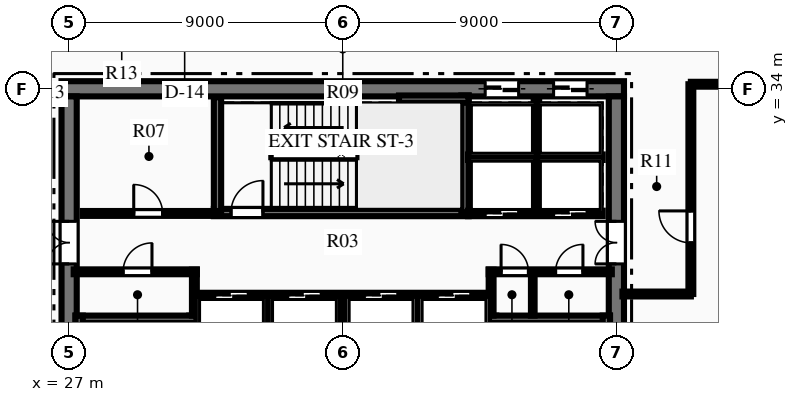
"""IFC4 building model, lengths in metres.
Left out: names, types, materials, properties, quantities, classifications, styles, units other than length and angle.
Written with IfcOpenShell. Run it as: python <this file> out.ifc"""

import sys

from ifc_helpers import new_model, si_unit, direction, frame, frame_2d, origin, place, context, subcontext, project, spatial, rectangle, extrude, element, fill, save


model = new_model("IFC4")
c1 = context("Model", 3, precision=1e-05, world=origin(), true_north=direction((0.0, 1.0)))
c2 = subcontext(c1, "Body", "Model", "MODEL_VIEW")
j1 = project(units=[si_unit("LENGTHUNIT", "METRE"), si_unit("PLANEANGLEUNIT", "RADIAN")], contexts=[c1])
p1 = place(None, origin())
s1 = spatial("IfcSite", under=j1, at=p1, CompositionType="ELEMENT")
p2 = place(p1, origin())
s2 = spatial("IfcBuilding", under=s1, at=p2, CompositionType="ELEMENT")
p3 = place(p2, frame((0.0, 0.0, 198.45)))
s3 = spatial("IfcBuildingStorey", under=s2, at=p3, CompositionType="ELEMENT", Elevation=198.45)
p4 = place(p3, frame((26.75, 34.0, 0.0), z_axis=(0.0, 0.0, 1.0), x_axis=(1.0, 0.0, 0.0)))
e1 = element("IfcWall", 1, at=p4, inside=s3, PredefinedType="SHEAR", context=c2, shape_type="SweptSolid", body=[
    extrude(rectangle(XDim=18.5, YDim=0.5, at=frame_2d((9.25, 0.0))), origin(), (0.0, 0.0, 1.0), 3.75),
])
p5 = place(p4, frame((13.935, 0.0, 0.0)))
e2 = element("IfcOpeningElement", 2, at=p5, cuts=e1, PredefinedType="OPENING", context=c2, shape_type="SweptSolid", body=[
    extrude(rectangle(XDim=1.1, YDim=2.15, at=frame_2d((0.55, 1.075))), frame((0.0, 0.26, 0.0), z_axis=(0.0, -1.0, 0.0), x_axis=(1.0, 0.0, 0.0)), (0.0, 0.0, 1.0), 0.52),
])
p6 = place(p4, frame((16.185, 0.0, 0.0)))
e3 = element("IfcOpeningElement", 3, at=p6, cuts=e1, PredefinedType="OPENING", context=c2, shape_type="SweptSolid", body=[
    extrude(rectangle(XDim=1.1, YDim=2.15, at=frame_2d((0.55, 1.075))), frame((0.0, 0.26, 0.0), z_axis=(0.0, -1.0, 0.0), x_axis=(1.0, 0.0, 0.0)), (0.0, 0.0, 1.0), 0.52),
])
p7 = place(p3, frame((27.0, 18.25, 0.0), z_axis=(0.0, 0.0, 1.0), x_axis=(0.0, 1.0, 0.0)))
e4 = element("IfcWall", 4, at=p7, inside=s3, PredefinedType="SHEAR", context=c2, shape_type="SweptSolid", body=[
    extrude(rectangle(XDim=15.5, YDim=0.5, at=frame_2d((7.75, 0.0))), origin(), (0.0, 0.0, 1.0), 3.75),
])
p8 = place(p7, frame((9.99, 0.0, 0.0)))
e5 = element("IfcOpeningElement", 5, at=p8, cuts=e4, PredefinedType="OPENING", context=c2, shape_type="SweptSolid", body=[
    extrude(rectangle(XDim=1.4, YDim=2.2, at=frame_2d((0.7, 1.1))), frame((0.0, 0.26, 0.0), z_axis=(0.0, -1.0, 0.0), x_axis=(1.0, 0.0, 0.0)), (0.0, 0.0, 1.0), 0.52),
])
p9 = place(p3, frame((45.0, 18.25, 0.0), z_axis=(0.0, 0.0, 1.0), x_axis=(0.0, 1.0, 0.0)))
e6 = element("IfcWall", 6, at=p9, inside=s3, PredefinedType="SHEAR", context=c2, shape_type="SweptSolid", body=[
    extrude(rectangle(XDim=15.5, YDim=0.5, at=frame_2d((7.75, 0.0))), origin(), (0.0, 0.0, 1.0), 3.75),
])
p10 = place(p9, frame((9.99, 0.0, 0.0)))
e7 = element("IfcOpeningElement", 7, at=p10, cuts=e6, PredefinedType="OPENING", context=c2, shape_type="SweptSolid", body=[
    extrude(rectangle(XDim=1.4, YDim=2.2, at=frame_2d((0.7, 1.1))), frame((0.0, 0.26, 0.0), z_axis=(0.0, -1.0, 0.0), x_axis=(1.0, 0.0, 0.0)), (0.0, 0.0, 1.0), 0.52),
])
p11 = place(p3, frame((31.07, 18.28, 0.0), z_axis=(0.0, 0.0, 1.0), x_axis=(0.0, 1.0, 0.0)))
e8 = element("IfcWall", 8, at=p11, inside=s3, PredefinedType="SHEAR", context=c2, shape_type="SweptSolid", body=[
    extrude(rectangle(XDim=8.26, YDim=0.24, at=frame_2d((4.13, 0.0))), origin(), (0.0, 0.0, 1.0), 3.75),
])
p12 = place(p11, frame((0.365, 0.0, 0.0)))
e9 = element("IfcOpeningElement", 9, at=p12, cuts=e8, PredefinedType="OPENING", context=c2, shape_type="SweptSolid", body=[
    extrude(rectangle(XDim=1.05, YDim=2.15, at=frame_2d((0.525, 1.075))), frame((0.0, 0.13, 0.0), z_axis=(0.0, -1.0, 0.0), x_axis=(1.0, 0.0, 0.0)), (0.0, 0.0, 1.0), 0.26),
])
p13 = place(p3, frame((27.21, 26.42, 0.0), z_axis=(0.0, 0.0, 1.0), x_axis=(1.0, 0.0, 0.0)))
e10 = element("IfcWall", 10, at=p13, inside=s3, PredefinedType="SHEAR", context=c2, shape_type="SweptSolid", body=[
    extrude(rectangle(XDim=3.98, YDim=0.24, at=frame_2d((1.99, 0.0))), origin(), (0.0, 0.0, 1.0), 3.75),
])
p14 = place(p3, frame((27.33, 18.28, 0.0), z_axis=(0.0, 0.0, 1.0), x_axis=(0.0, 1.0, 0.0)))
e11 = element("IfcWall", 11, at=p14, inside=s3, PredefinedType="SHEAR", context=c2, shape_type="SweptSolid", body=[
    extrude(rectangle(XDim=8.26, YDim=0.24, at=frame_2d((4.13, 0.0))), origin(), (0.0, 0.0, 1.0), 3.75),
])
p15 = place(p3, frame((40.93, 18.28, 0.0), z_axis=(0.0, 0.0, 1.0), x_axis=(0.0, 1.0, 0.0)))
e12 = element("IfcWall", 12, at=p15, inside=s3, PredefinedType="SHEAR", context=c2, shape_type="SweptSolid", body=[
    extrude(rectangle(XDim=8.26, YDim=0.24, at=frame_2d((4.13, 0.0))), origin(), (0.0, 0.0, 1.0), 3.75),
])
p16 = place(p15, frame((0.365, 0.0, 0.0)))
e13 = element("IfcOpeningElement", 13, at=p16, cuts=e12, PredefinedType="OPENING", context=c2, shape_type="SweptSolid", body=[
    extrude(rectangle(XDim=1.05, YDim=2.15, at=frame_2d((0.525, 1.075))), frame((0.0, 0.13, 0.0), z_axis=(0.0, -1.0, 0.0), x_axis=(1.0, 0.0, 0.0)), (0.0, 0.0, 1.0), 0.26),
])
p17 = place(p3, frame((40.81, 26.42, 0.0), z_axis=(0.0, 0.0, 1.0), x_axis=(1.0, 0.0, 0.0)))
e14 = element("IfcWall", 14, at=p17, inside=s3, PredefinedType="SHEAR", context=c2, shape_type="SweptSolid", body=[
    extrude(rectangle(XDim=3.98, YDim=0.24, at=frame_2d((1.99, 0.0))), origin(), (0.0, 0.0, 1.0), 3.75),
])
p18 = place(p3, frame((44.67, 18.28, 0.0), z_axis=(0.0, 0.0, 1.0), x_axis=(0.0, 1.0, 0.0)))
e15 = element("IfcWall", 15, at=p18, inside=s3, PredefinedType="SHEAR", context=c2, shape_type="SweptSolid", body=[
    extrude(rectangle(XDim=8.26, YDim=0.24, at=frame_2d((4.13, 0.0))), origin(), (0.0, 0.0, 1.0), 3.75),
])
p19 = place(p3, frame((31.76, 29.93, 0.0), z_axis=(0.0, 0.0, 1.0), x_axis=(1.0, 0.0, 0.0)))
e16 = element("IfcWall", 16, at=p19, inside=s3, PredefinedType="SHEAR", context=c2, shape_type="SweptSolid", body=[
    extrude(rectangle(XDim=8.38, YDim=0.24, at=frame_2d((4.19, 0.0))), origin(), (0.0, 0.0, 1.0), 3.75),
])
p20 = place(p19, frame((0.565, 0.0, 0.0)))
e17 = element("IfcOpeningElement", 17, at=p20, cuts=e16, PredefinedType="OPENING", context=c2, shape_type="SweptSolid", body=[
    extrude(rectangle(XDim=1.05, YDim=2.15, at=frame_2d((0.525, 1.075))), frame((0.0, 0.13, 0.0), z_axis=(0.0, -1.0, 0.0), x_axis=(1.0, 0.0, 0.0)), (0.0, 0.0, 1.0), 0.26),
])
p21 = place(p3, frame((31.88, 29.93, 0.0), z_axis=(0.0, 0.0, 1.0), x_axis=(0.0, 1.0, 0.0)))
e18 = element("IfcWall", 18, at=p21, inside=s3, PredefinedType="SHEAR", context=c2, shape_type="SweptSolid", body=[
    extrude(rectangle(XDim=3.79, YDim=0.24, at=frame_2d((1.895, 0.0))), origin(), (0.0, 0.0, 1.0), 3.75),
])
p22 = place(p3, frame((40.02, 29.93, 0.0), z_axis=(0.0, 0.0, 1.0), x_axis=(0.0, 1.0, 0.0)))
e19 = element("IfcWall", 19, at=p22, inside=s3, PredefinedType="SHEAR", context=c2, shape_type="SweptSolid", body=[
    extrude(rectangle(XDim=3.85, YDim=0.24, at=frame_2d((1.925, 0.0))), origin(), (0.0, 0.0, 1.0), 3.75),
])
p23 = place(p3, frame((37.85, 33.66, 0.0), z_axis=(0.0, 0.0, 1.0), x_axis=(1.0, 0.0, 0.0)))
e20 = element("IfcWall", 20, at=p23, inside=s3, PredefinedType="SHEAR", context=c2, shape_type="SweptSolid", body=[
    extrude(rectangle(XDim=2.29, YDim=0.24, at=frame_2d((1.145, 0.0))), origin(), (0.0, 0.0, 1.0), 3.75),
])
p24 = place(p3, frame((27.15, 27.98, 0.0), z_axis=(0.0, 0.0, 1.0), x_axis=(1.0, 0.0, 0.0)))
e21 = element("IfcWall", 21, at=p24, inside=s3, PredefinedType="PARTITIONING", context=c2, shape_type="SweptSolid", body=[
    extrude(rectangle(XDim=4.05, YDim=0.16, at=frame_2d((2.025, 0.0))), origin(), (0.0, 0.0, 1.0), 3.47),
])
p25 = place(p24, frame((1.625, 0.0, 0.0)))
e22 = element("IfcOpeningElement", 22, at=p25, cuts=e21, PredefinedType="OPENING", context=c2, shape_type="SweptSolid", body=[
    extrude(rectangle(XDim=0.95, YDim=2.15, at=frame_2d((0.475, 1.075))), frame((0.0, 0.09, 0.0), z_axis=(0.0, -1.0, 0.0), x_axis=(1.0, 0.0, 0.0)), (0.0, 0.0, 1.0), 0.18),
])
p26 = place(p3, frame((31.12, 26.54, 0.0), z_axis=(0.0, 0.0, 1.0), x_axis=(0.0, 1.0, 0.0)))
e23 = element("IfcWall", 23, at=p26, inside=s3, PredefinedType="PARTITIONING", context=c2, shape_type="SweptSolid", body=[
    extrude(rectangle(XDim=1.51, YDim=0.16, at=frame_2d((0.755, 0.0))), origin(), (0.0, 0.0, 1.0), 3.47),
])
p27 = place(p3, frame((40.8, 27.98, 0.0), z_axis=(0.0, 0.0, 1.0), x_axis=(1.0, 0.0, 0.0)))
e24 = element("IfcWall", 24, at=p27, inside=s3, PredefinedType="PARTITIONING", context=c2, shape_type="SweptSolid", body=[
    extrude(rectangle(XDim=4.05, YDim=0.16, at=frame_2d((2.025, 0.0))), origin(), (0.0, 0.0, 1.0), 3.47),
])
p28 = place(p27, frame((0.407, 0.0, 0.0)))
e25 = element("IfcOpeningElement", 25, at=p28, cuts=e24, PredefinedType="OPENING", context=c2, shape_type="SweptSolid", body=[
    extrude(rectangle(XDim=0.9, YDim=2.15, at=frame_2d((0.45, 1.075))), frame((0.0, 0.09, 0.0), z_axis=(0.0, -1.0, 0.0), x_axis=(1.0, 0.0, 0.0)), (0.0, 0.0, 1.0), 0.18),
])
p29 = place(p27, frame((2.2, 0.0, 0.0)))
e26 = element("IfcOpeningElement", 26, at=p29, cuts=e24, PredefinedType="OPENING", context=c2, shape_type="SweptSolid", body=[
    extrude(rectangle(XDim=0.9, YDim=2.15, at=frame_2d((0.45, 1.075))), frame((0.0, 0.09, 0.0), z_axis=(0.0, -1.0, 0.0), x_axis=(1.0, 0.0, 0.0)), (0.0, 0.0, 1.0), 0.18),
])
p30 = place(p3, frame((40.88, 26.54, 0.0), z_axis=(0.0, 0.0, 1.0), x_axis=(0.0, 1.0, 0.0)))
e27 = element("IfcWall", 27, at=p30, inside=s3, PredefinedType="PARTITIONING", context=c2, shape_type="SweptSolid", body=[
    extrude(rectangle(XDim=1.51, YDim=0.16, at=frame_2d((0.755, 0.0))), origin(), (0.0, 0.0, 1.0), 3.47),
])
p31 = place(p3, frame((42.25, 26.54, 0.0), z_axis=(0.0, 0.0, 1.0), x_axis=(0.0, 1.0, 0.0)))
e28 = element("IfcWall", 28, at=p31, inside=s3, PredefinedType="PARTITIONING", context=c2, shape_type="SweptSolid", body=[
    extrude(rectangle(XDim=1.44, YDim=0.12, at=frame_2d((0.72, 0.0))), origin(), (0.0, 0.0, 1.0), 3.47),
])
p32 = place(p3, frame((27.45, 29.9, 0.0), z_axis=(0.0, 0.0, 1.0), x_axis=(1.0, 0.0, 0.0)))
e29 = element("IfcWall", 29, at=p32, inside=s3, PredefinedType="PARTITIONING", context=c2, shape_type="SweptSolid", body=[
    extrude(rectangle(XDim=4.43, YDim=0.16, at=frame_2d((2.215, 0.0))), origin(), (0.0, 0.0, 1.0), 3.47),
])
p33 = place(p32, frame((1.675, 0.0, 0.0)))
e30 = element("IfcOpeningElement", 30, at=p33, cuts=e29, PredefinedType="OPENING", context=c2, shape_type="SweptSolid", body=[
    extrude(rectangle(XDim=0.95, YDim=2.15, at=frame_2d((0.475, 1.075))), frame((0.0, 0.09, 0.0), z_axis=(0.0, -1.0, 0.0), x_axis=(1.0, 0.0, 0.0)), (0.0, 0.0, 1.0), 0.18),
])
p34 = place(p3, frame((40.12, 29.9, 0.0), z_axis=(0.0, 0.0, 1.0), x_axis=(1.0, 0.0, 0.0)))
e31 = element("IfcWall", 31, at=p34, inside=s3, PredefinedType="PARTITIONING", context=c2, shape_type="SweptSolid", body=[
    extrude(rectangle(XDim=4.43, YDim=0.18, at=frame_2d((2.215, 0.0))), origin(), (0.0, 0.0, 1.0), 3.47),
])
p35 = place(p34, frame((0.565, 0.0, 0.0)))
e32 = element("IfcOpeningElement", 32, at=p35, cuts=e31, PredefinedType="OPENING", context=c2, shape_type="SweptSolid", body=[
    extrude(rectangle(XDim=1.1, YDim=2.15, at=frame_2d((0.55, 1.075))), frame((0.0, 0.1, 0.0), z_axis=(0.0, -1.0, 0.0), x_axis=(1.0, 0.0, 0.0)), (0.0, 0.0, 1.0), 0.2),
])
p36 = place(p34, frame((2.815, 0.0, 0.0)))
e33 = element("IfcOpeningElement", 33, at=p36, cuts=e31, PredefinedType="OPENING", context=c2, shape_type="SweptSolid", body=[
    extrude(rectangle(XDim=1.1, YDim=2.15, at=frame_2d((0.55, 1.075))), frame((0.0, 0.1, 0.0), z_axis=(0.0, -1.0, 0.0), x_axis=(1.0, 0.0, 0.0)), (0.0, 0.0, 1.0), 0.2),
])
p37 = place(p3, frame((40.12, 31.75, 0.0), z_axis=(0.0, 0.0, 1.0), x_axis=(1.0, 0.0, 0.0)))
e34 = element("IfcWall", 34, at=p37, inside=s3, PredefinedType="PARTITIONING", context=c2, shape_type="SweptSolid", body=[
    extrude(rectangle(XDim=4.43, YDim=0.18, at=frame_2d((2.215, 0.0))), origin(), (0.0, 0.0, 1.0), 3.47),
])
p38 = place(p3, frame((42.37, 29.9, 0.0), z_axis=(0.0, 0.0, 1.0), x_axis=(0.0, 1.0, 0.0)))
e35 = element("IfcWall", 35, at=p38, inside=s3, PredefinedType="PARTITIONING", context=c2, shape_type="SweptSolid", body=[
    extrude(rectangle(XDim=3.75, YDim=0.18, at=frame_2d((1.875, 0.0))), origin(), (0.0, 0.0, 1.0), 3.47),
])
p39 = place(p3, frame((31.2, 27.2, 0.0), z_axis=(0.0, 0.0, 1.0), x_axis=(1.0, 0.0, 0.0)))
e36 = element("IfcWall", 36, at=p39, inside=s3, PredefinedType="PARTITIONING", context=c2, shape_type="SweptSolid", body=[
    extrude(rectangle(XDim=9.6, YDim=0.18, at=frame_2d((4.8, 0.0))), origin(), (0.0, 0.0, 1.0), 3.47),
])
p40 = place(p39, frame((0.59, 0.0, 0.0)))
e37 = element("IfcOpeningElement", 37, at=p40, cuts=e36, PredefinedType="OPENING", context=c2, shape_type="SweptSolid", body=[
    extrude(rectangle(XDim=1.1, YDim=2.15, at=frame_2d((0.55, 1.075))), frame((0.0, 0.1, 0.0), z_axis=(0.0, -1.0, 0.0), x_axis=(1.0, 0.0, 0.0)), (0.0, 0.0, 1.0), 0.2),
])
p41 = place(p39, frame((2.99, 0.0, 0.0)))
e38 = element("IfcOpeningElement", 38, at=p41, cuts=e36, PredefinedType="OPENING", context=c2, shape_type="SweptSolid", body=[
    extrude(rectangle(XDim=1.1, YDim=2.15, at=frame_2d((0.55, 1.075))), frame((0.0, 0.1, 0.0), z_axis=(0.0, -1.0, 0.0), x_axis=(1.0, 0.0, 0.0)), (0.0, 0.0, 1.0), 0.2),
])
p42 = place(p39, frame((5.51, 0.0, 0.0)))
e39 = element("IfcOpeningElement", 39, at=p42, cuts=e36, PredefinedType="OPENING", context=c2, shape_type="SweptSolid", body=[
    extrude(rectangle(XDim=1.1, YDim=2.15, at=frame_2d((0.55, 1.075))), frame((0.0, 0.1, 0.0), z_axis=(0.0, -1.0, 0.0), x_axis=(1.0, 0.0, 0.0)), (0.0, 0.0, 1.0), 0.2),
])
p43 = place(p39, frame((7.91, 0.0, 0.0)))
e40 = element("IfcOpeningElement", 40, at=p43, cuts=e36, PredefinedType="OPENING", context=c2, shape_type="SweptSolid", body=[
    extrude(rectangle(XDim=1.1, YDim=2.15, at=frame_2d((0.55, 1.075))), frame((0.0, 0.1, 0.0), z_axis=(0.0, -1.0, 0.0), x_axis=(1.0, 0.0, 0.0)), (0.0, 0.0, 1.0), 0.2),
])
for number, where, z_axis, x_axis in (
    (41, (33.54, 25.3, 0.0), (0.0, 0.0, 1.0), (0.0, 1.0, 0.0)),
    (42, (36.0, 25.3, 0.0), (0.0, 0.0, 1.0), (0.0, 1.0, 0.0)),
    (43, (38.46, 25.3, 0.0), (0.0, 0.0, 1.0), (0.0, 1.0, 0.0)),
):
    element("IfcWall", number, at=place(p3, frame(where, z_axis=z_axis, x_axis=x_axis)), inside=s3, PredefinedType="PARTITIONING", context=c2, shape_type="SweptSolid", body=[
        extrude(rectangle(XDim=1.9, YDim=0.18, at=frame_2d((0.95, 0.0))), origin(), (0.0, 0.0, 1.0), 3.47),
    ])
p44 = place(p3, frame((47.45, 34.15, 0.0), z_axis=(0.0, 0.0, 1.0), x_axis=(1.0, 0.0, 0.0)))
e44 = element("IfcWall", 44, at=p44, inside=s3, PredefinedType="PARTITIONING", context=c2, shape_type="SweptSolid", body=[
    extrude(rectangle(XDim=6.35, YDim=0.16, at=frame_2d((3.175, 0.0))), origin(), (0.0, 0.0, 1.0), 3.47),
])
p45 = place(p3, frame((47.45, 27.25, 0.0), z_axis=(0.0, 0.0, 1.0), x_axis=(0.0, 1.0, 0.0)))
e45 = element("IfcWall", 45, at=p45, inside=s3, PredefinedType="PARTITIONING", context=c2, shape_type="SweptSolid", body=[
    extrude(rectangle(XDim=6.9, YDim=0.16, at=frame_2d((3.45, 0.0))), origin(), (0.0, 0.0, 1.0), 3.47),
])
p46 = place(p45, frame((1.683, 0.0, 0.0)))
e46 = element("IfcOpeningElement", 46, at=p46, cuts=e45, PredefinedType="OPENING", context=c2, shape_type="SweptSolid", body=[
    extrude(rectangle(XDim=1.05, YDim=2.15, at=frame_2d((0.525, 1.075))), frame((0.0, 0.09, 0.0), z_axis=(0.0, -1.0, 0.0), x_axis=(1.0, 0.0, 0.0)), (0.0, 0.0, 1.0), 0.18),
])
p47 = place(p3, frame((45.2, 27.25, 0.0), z_axis=(0.0, 0.0, 1.0), x_axis=(1.0, 0.0, 0.0)))
e47 = element("IfcWall", 47, at=p47, inside=s3, PredefinedType="PARTITIONING", context=c2, shape_type="SweptSolid", body=[
    extrude(rectangle(XDim=2.25, YDim=0.16, at=frame_2d((1.125, 0.0))), origin(), (0.0, 0.0, 1.0), 3.47),
])
p48 = place(p25, origin())
e48 = element("IfcDoor", 48, at=p48, inside=s3, OperationType="SINGLE_SWING_RIGHT", PredefinedType="DOOR", context=c2, shape_type="SweptSolid", body=[
    extrude(rectangle(XDim=0.95, YDim=2.15, at=frame_2d((0.475, 1.075))), frame((0.0, 0.025, 0.0), z_axis=(0.0, -1.0, 0.0), x_axis=(1.0, 0.0, 0.0)), (0.0, 0.0, 1.0), 0.05),
])
fill(e22, e48)
p49 = place(p28, origin())
e49 = element("IfcDoor", 49, at=p49, inside=s3, OperationType="SINGLE_SWING_LEFT", PredefinedType="DOOR", context=c2, shape_type="SweptSolid", body=[
    extrude(rectangle(XDim=0.9, YDim=2.15, at=frame_2d((0.45, 1.075))), frame((0.0, 0.025, 0.0), z_axis=(0.0, -1.0, 0.0), x_axis=(1.0, 0.0, 0.0)), (0.0, 0.0, 1.0), 0.05),
])
fill(e25, e49)
p50 = place(p29, origin())
e50 = element("IfcDoor", 50, at=p50, inside=s3, OperationType="SINGLE_SWING_RIGHT", PredefinedType="DOOR", context=c2, shape_type="SweptSolid", body=[
    extrude(rectangle(XDim=0.9, YDim=2.15, at=frame_2d((0.45, 1.075))), frame((0.0, 0.025, 0.0), z_axis=(0.0, -1.0, 0.0), x_axis=(1.0, 0.0, 0.0)), (0.0, 0.0, 1.0), 0.05),
])
fill(e26, e50)
p51 = place(p33, origin())
e51 = element("IfcDoor", 51, at=p51, inside=s3, OperationType="SINGLE_SWING_LEFT", PredefinedType="DOOR", context=c2, shape_type="SweptSolid", body=[
    extrude(rectangle(XDim=0.95, YDim=2.15, at=frame_2d((0.475, 1.075))), frame((0.0, 0.025, 0.0), z_axis=(0.0, -1.0, 0.0), x_axis=(1.0, 0.0, 0.0)), (0.0, 0.0, 1.0), 0.05),
])
fill(e30, e51)
p52 = place(p20, origin())
e52 = element("IfcDoor", 52, at=p52, inside=s3, OperationType="SINGLE_SWING_RIGHT", PredefinedType="DOOR", context=c2, shape_type="SweptSolid", body=[
    extrude(rectangle(XDim=1.05, YDim=2.15, at=frame_2d((0.525, 1.075))), frame((0.0, 0.025, 0.0), z_axis=(0.0, -1.0, 0.0), x_axis=(1.0, 0.0, 0.0)), (0.0, 0.0, 1.0), 0.05),
])
fill(e17, e52)
p53 = place(p8, origin())
e53 = element("IfcDoor", 53, at=p53, inside=s3, OperationType="DOUBLE_DOOR_SINGLE_SWING", PredefinedType="DOOR", context=c2, shape_type="SweptSolid", body=[
    extrude(rectangle(XDim=1.4, YDim=2.2, at=frame_2d((0.7, 1.1))), frame((0.0, 0.025, 0.0), z_axis=(0.0, -1.0, 0.0), x_axis=(1.0, 0.0, 0.0)), (0.0, 0.0, 1.0), 0.05),
])
fill(e5, e53)
p54 = place(p10, origin())
e54 = element("IfcDoor", 54, at=p54, inside=s3, OperationType="DOUBLE_DOOR_SINGLE_SWING", PredefinedType="DOOR", context=c2, shape_type="SweptSolid", body=[
    extrude(rectangle(XDim=1.4, YDim=2.2, at=frame_2d((0.7, 1.1))), frame((0.0, 0.025, 0.0), z_axis=(0.0, -1.0, 0.0), x_axis=(1.0, 0.0, 0.0)), (0.0, 0.0, 1.0), 0.05),
])
fill(e7, e54)
p55 = place(p46, origin())
e55 = element("IfcDoor", 55, at=p55, inside=s3, OperationType="SINGLE_SWING_RIGHT", PredefinedType="DOOR", context=c2, shape_type="SweptSolid", body=[
    extrude(rectangle(XDim=1.05, YDim=2.15, at=frame_2d((0.525, 1.075))), frame((0.0, 0.025, 0.0), z_axis=(0.0, -1.0, 0.0), x_axis=(1.0, 0.0, 0.0)), (0.0, 0.0, 1.0), 0.05),
])
fill(e46, e55)
p56 = place(p35, origin())
e56 = element("IfcDoor", 56, at=p56, inside=s3, OperationType="SLIDING_TO_LEFT", PredefinedType="DOOR", context=c2, shape_type="SweptSolid", body=[
    extrude(rectangle(XDim=1.1, YDim=2.15, at=frame_2d((0.55, 1.075))), frame((0.0, 0.025, 0.0), z_axis=(0.0, -1.0, 0.0), x_axis=(1.0, 0.0, 0.0)), (0.0, 0.0, 1.0), 0.05),
])
fill(e32, e56)
p57 = place(p36, origin())
e57 = element("IfcDoor", 57, at=p57, inside=s3, OperationType="SLIDING_TO_LEFT", PredefinedType="DOOR", context=c2, shape_type="SweptSolid", body=[
    extrude(rectangle(XDim=1.1, YDim=2.15, at=frame_2d((0.55, 1.075))), frame((0.0, 0.025, 0.0), z_axis=(0.0, -1.0, 0.0), x_axis=(1.0, 0.0, 0.0)), (0.0, 0.0, 1.0), 0.05),
])
fill(e33, e57)
p58 = place(p5, origin())
e58 = element("IfcDoor", 58, at=p58, inside=s3, OperationType="SLIDING_TO_LEFT", PredefinedType="DOOR", context=c2, shape_type="SweptSolid", body=[
    extrude(rectangle(XDim=1.1, YDim=2.15, at=frame_2d((0.55, 1.075))), frame((0.0, 0.025, 0.0), z_axis=(0.0, -1.0, 0.0), x_axis=(1.0, 0.0, 0.0)), (0.0, 0.0, 1.0), 0.05),
])
fill(e2, e58)
p59 = place(p6, origin())
e59 = element("IfcDoor", 59, at=p59, inside=s3, OperationType="SLIDING_TO_LEFT", PredefinedType="DOOR", context=c2, shape_type="SweptSolid", body=[
    extrude(rectangle(XDim=1.1, YDim=2.15, at=frame_2d((0.55, 1.075))), frame((0.0, 0.025, 0.0), z_axis=(0.0, -1.0, 0.0), x_axis=(1.0, 0.0, 0.0)), (0.0, 0.0, 1.0), 0.05),
])
fill(e3, e59)
p60 = place(p40, origin())
e60 = element("IfcDoor", 60, at=p60, inside=s3, OperationType="SLIDING_TO_LEFT", PredefinedType="DOOR", context=c2, shape_type="SweptSolid", body=[
    extrude(rectangle(XDim=1.1, YDim=2.15, at=frame_2d((0.55, 1.075))), frame((0.0, 0.025, 0.0), z_axis=(0.0, -1.0, 0.0), x_axis=(1.0, 0.0, 0.0)), (0.0, 0.0, 1.0), 0.05),
])
fill(e37, e60)
p61 = place(p41, origin())
e61 = element("IfcDoor", 61, at=p61, inside=s3, OperationType="SLIDING_TO_LEFT", PredefinedType="DOOR", context=c2, shape_type="SweptSolid", body=[
    extrude(rectangle(XDim=1.1, YDim=2.15, at=frame_2d((0.55, 1.075))), frame((0.0, 0.025, 0.0), z_axis=(0.0, -1.0, 0.0), x_axis=(1.0, 0.0, 0.0)), (0.0, 0.0, 1.0), 0.05),
])
fill(e38, e61)
p62 = place(p42, origin())
e62 = element("IfcDoor", 62, at=p62, inside=s3, OperationType="SLIDING_TO_LEFT", PredefinedType="DOOR", context=c2, shape_type="SweptSolid", body=[
    extrude(rectangle(XDim=1.1, YDim=2.15, at=frame_2d((0.55, 1.075))), frame((0.0, 0.025, 0.0), z_axis=(0.0, -1.0, 0.0), x_axis=(1.0, 0.0, 0.0)), (0.0, 0.0, 1.0), 0.05),
])
fill(e39, e62)
p63 = place(p43, origin())
e63 = element("IfcDoor", 63, at=p63, inside=s3, OperationType="SLIDING_TO_LEFT", PredefinedType="DOOR", context=c2, shape_type="SweptSolid", body=[
    extrude(rectangle(XDim=1.1, YDim=2.15, at=frame_2d((0.55, 1.075))), frame((0.0, 0.025, 0.0), z_axis=(0.0, -1.0, 0.0), x_axis=(1.0, 0.0, 0.0)), (0.0, 0.0, 1.0), 0.05),
])
fill(e40, e63)
save(model, sys.argv[1])
